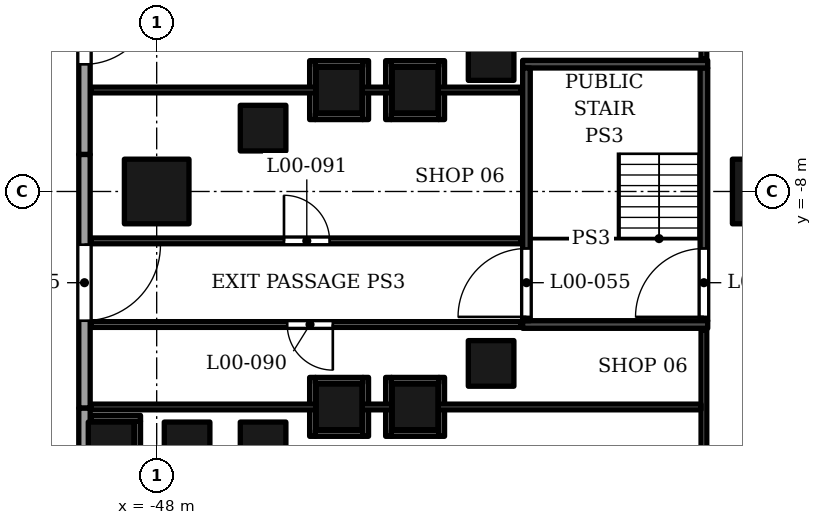
"""IFC4 building model, lengths in metres.
Left out: names, types, materials, properties, quantities, classifications, styles, units other than length and angle.
Written with IfcOpenShell. Run it as: python <this file> out.ifc"""

import sys

from ifc_helpers import new_model, si_unit, direction, frame, frame_2d, origin, origin_2d, place, context, subcontext, project, spatial, rectangle, extrude, element, fill, save


model = new_model("IFC4")
c1 = context("Model", 3, precision=1e-05, world=origin(), true_north=direction((0.0, 1.0)))
c2 = subcontext(c1, "Body", "Model", "MODEL_VIEW")
j1 = project(units=[si_unit("LENGTHUNIT", "METRE"), si_unit("PLANEANGLEUNIT", "RADIAN")], contexts=[c1])
p1 = place(None, origin())
s1 = spatial("IfcSite", under=j1, at=p1, CompositionType="ELEMENT")
p2 = place(p1, origin())
s2 = spatial("IfcBuilding", under=s1, at=p2, CompositionType="ELEMENT")
p3 = place(p2, origin())
s3 = spatial("IfcBuildingStorey", under=s2, at=p3, CompositionType="ELEMENT", Elevation=0.0)
for number, where, z_axis, x_axis in (
    (1, (-48.0, -8.0, 0.0), (0.0, 0.0, 1.0), (1.0, 0.0, 0.0)),
    (2, (-32.0, -8.0, 0.0), (0.0, 0.0, 1.0), (1.0, 0.0, 0.0)),
):
    element("IfcColumn", number, at=place(p3, frame(where, z_axis=z_axis, x_axis=x_axis)), inside=s3, PredefinedType="COLUMN", context=c2, shape_type="SweptSolid", body=[
        extrude(rectangle(XDim=1.7, YDim=1.7, at=origin_2d()), origin(), (0.0, 0.0, 1.0), 9.0),
    ])
for number, where, z_axis, x_axis in (
    (3, (-39.2, -12.524, 0.0), (0.0, 0.0, 1.0), (1.0, 0.0, 0.0)),
    (4, (-39.2, -4.476, 0.0), (0.0, 0.0, 1.0), (1.0, 0.0, 0.0)),
    (5, (-41.2, -13.667, 0.0), (0.0, 0.0, 1.0), (1.0, 0.0, 0.0)),
    (6, (-41.2, -5.333, 0.0), (0.0, 0.0, 1.0), (1.0, 0.0, 0.0)),
    (7, (-43.2, -13.667, 0.0), (0.0, 0.0, 1.0), (1.0, 0.0, 0.0)),
    (8, (-43.2, -5.333, 0.0), (0.0, 0.0, 1.0), (1.0, 0.0, 0.0)),
    (9, (-45.2, -14.667, 0.0), (0.0, 0.0, 1.0), (1.0, 0.0, 0.0)),
    (10, (-45.2, -6.333, 0.0), (0.0, 0.0, 1.0), (1.0, 0.0, 0.0)),
    (11, (-47.2, -14.667, 0.0), (0.0, 0.0, 1.0), (1.0, 0.0, 0.0)),
    (12, (-49.2, -14.667, 0.0), (0.0, 0.0, 1.0), (1.0, 0.0, 0.0)),
):
    element("IfcColumn", number, at=place(p3, frame(where, z_axis=z_axis, x_axis=x_axis)), inside=s3, PredefinedType="COLUMN", context=c2, shape_type="SweptSolid", body=[
        extrude(rectangle(XDim=1.2, YDim=1.2, at=origin_2d()), origin(), (0.0, 0.0, 1.0), 9.0),
    ])
p4 = place(p3, frame((-49.9, -2.527, 0.0), z_axis=(0.0, 0.0, 1.0), x_axis=(0.0, -1.0, 0.0)))
e13 = element("IfcWall", 13, at=p4, inside=s3, PredefinedType="ELEMENTEDWALL", context=c2, shape_type="SweptSolid", body=[
    extrude(rectangle(XDim=4.5, YDim=0.3, at=frame_2d((2.25, 0.0))), origin(), (0.0, 0.0, 1.0), 7.6),
])
p5 = place(p4, frame((0.327, 0.0, 0.0)))
e14 = element("IfcOpeningElement", 14, at=p5, cuts=e13, PredefinedType="OPENING", context=c2, shape_type="SweptSolid", body=[
    extrude(rectangle(XDim=1.8, YDim=2.7, at=frame_2d((0.9, 1.35))), frame((0.0, 0.16, 0.0), z_axis=(0.0, -1.0, 0.0), x_axis=(1.0, 0.0, 0.0)), (0.0, 0.0, 1.0), 0.32),
])
p6 = place(p3, frame((-49.9, -7.027, 0.0), z_axis=(0.0, 0.0, 1.0), x_axis=(0.0, -1.0, 0.0)))
e15 = element("IfcWall", 15, at=p6, inside=s3, PredefinedType="ELEMENTEDWALL", context=c2, shape_type="SweptSolid", body=[
    extrude(rectangle(XDim=6.675, YDim=0.3, at=frame_2d((3.337, 0.0))), origin(), (0.0, 0.0, 1.0), 7.6),
])
p7 = place(p6, frame((2.373, 0.0, 0.0)))
e16 = element("IfcOpeningElement", 16, at=p7, cuts=e15, PredefinedType="OPENING", context=c2, shape_type="SweptSolid", body=[
    extrude(rectangle(XDim=2.0, YDim=2.4, at=frame_2d((1.0, 1.2))), frame((0.0, 0.16, 0.0), z_axis=(0.0, -1.0, 0.0), x_axis=(1.0, 0.0, 0.0)), (0.0, 0.0, 1.0), 0.32),
])
p8 = place(p3, frame((-49.9, -13.702, 0.0), z_axis=(0.0, 0.0, 1.0), x_axis=(0.0, -1.0, 0.0)))
e17 = element("IfcWall", 17, at=p8, inside=s3, PredefinedType="ELEMENTEDWALL", context=c2, shape_type="SweptSolid", body=[
    extrude(rectangle(XDim=8.55, YDim=0.3, at=frame_2d((4.275, 0.0))), origin(), (0.0, 0.0, 1.0), 7.6),
])
p9 = place(p8, frame((2.302, 0.0, 0.0)))
e18 = element("IfcOpeningElement", 18, at=p9, cuts=e17, PredefinedType="OPENING", context=c2, shape_type="SweptSolid", body=[
    extrude(rectangle(XDim=3.0, YDim=2.7, at=frame_2d((1.5, 1.35))), frame((0.0, 0.16, 0.0), z_axis=(0.0, -1.0, 0.0), x_axis=(1.0, 0.0, 0.0)), (0.0, 0.0, 1.0), 0.32),
])
for number, where, z_axis, x_axis in (
    (19, (-49.85, 4.093, 9.0), (0.0, 0.0, 1.0), (0.0, -1.0, 0.0)),
    (20, (-49.85, -10.605, 9.0), (0.0, 0.0, 1.0), (0.0, -1.0, 0.0)),
):
    element("IfcWall", number, at=place(p3, frame(where, z_axis=z_axis, x_axis=x_axis)), inside=s3, PredefinedType="PARAPET", context=c2, shape_type="SweptSolid", body=[
        extrude(rectangle(XDim=14.698, YDim=0.3, at=frame_2d((7.349, 0.0))), origin(), (0.0, 0.0, 1.0), 1.1),
    ])
for number, where, z_axis, x_axis in (
    (21, (-38.37, -11.5, 0.0), (0.0, 0.0, 1.0), (1.0, 0.0, 0.0)),
    (22, (-38.37, -4.65, 0.0), (0.0, 0.0, 1.0), (1.0, 0.0, 0.0)),
):
    element("IfcWall", number, at=place(p3, frame(where, z_axis=z_axis, x_axis=x_axis)), inside=s3, PredefinedType="SOLIDWALL", context=c2, shape_type="SweptSolid", body=[
        extrude(rectangle(XDim=4.87, YDim=0.2, at=frame_2d((2.435, 0.0))), origin(), (0.0, 0.0, 1.0), 8.5),
    ])
p10 = place(p3, frame((-38.27, -11.4, 0.0), z_axis=(0.0, 0.0, 1.0), x_axis=(0.0, 1.0, 0.0)))
e23 = element("IfcWall", 23, at=p10, inside=s3, PredefinedType="SOLIDWALL", context=c2, shape_type="SweptSolid", body=[
    extrude(rectangle(XDim=6.65, YDim=0.2, at=frame_2d((3.325, 0.0))), origin(), (0.0, 0.0, 1.0), 8.5),
])
p11 = place(p10, frame((0.1, 0.0, 0.0)))
e24 = element("IfcOpeningElement", 24, at=p11, cuts=e23, PredefinedType="OPENING", context=c2, shape_type="SweptSolid", body=[
    extrude(rectangle(XDim=1.8, YDim=2.4, at=frame_2d((0.9, 1.2))), frame((0.0, 0.11, 0.0), z_axis=(0.0, -1.0, 0.0), x_axis=(1.0, 0.0, 0.0)), (0.0, 0.0, 1.0), 0.22),
])
p12 = place(p3, frame((-33.6, -11.4, 0.0), z_axis=(0.0, 0.0, 1.0), x_axis=(0.0, 1.0, 0.0)))
e25 = element("IfcWall", 25, at=p12, inside=s3, PredefinedType="SOLIDWALL", context=c2, shape_type="SweptSolid", body=[
    extrude(rectangle(XDim=6.65, YDim=0.2, at=frame_2d((3.325, 0.0))), origin(), (0.0, 0.0, 1.0), 8.5),
])
p13 = place(p12, frame((0.1, 0.0, 0.0)))
e26 = element("IfcOpeningElement", 26, at=p13, cuts=e25, PredefinedType="OPENING", context=c2, shape_type="SweptSolid", body=[
    extrude(rectangle(XDim=1.8, YDim=2.4, at=frame_2d((0.9, 1.2))), frame((0.0, 0.11, 0.0), z_axis=(0.0, -1.0, 0.0), x_axis=(1.0, 0.0, 0.0)), (0.0, 0.0, 1.0), 0.22),
])
p14 = place(p3, frame((-33.6, -20.61, 0.0), z_axis=(0.0, 0.0, 1.0), x_axis=(0.0, 1.0, 0.0)))
e27 = element("IfcWall", 27, at=p14, inside=s3, PredefinedType="PARTITIONING", context=c2, shape_type="SweptSolid", body=[
    extrude(rectangle(XDim=8.97, YDim=0.15, at=frame_2d((4.485, 0.0))), origin(), (0.0, 0.0, 1.0), 8.5),
])
p15 = place(p14, frame((2.711, 0.0, 0.0)))
e28 = element("IfcOpeningElement", 28, at=p15, cuts=e27, PredefinedType="OPENING", context=c2, shape_type="SweptSolid", body=[
    extrude(rectangle(XDim=1.2, YDim=2.1, at=frame_2d((0.6, 1.05))), frame((0.0, 0.085, 0.0), z_axis=(0.0, -1.0, 0.0), x_axis=(1.0, 0.0, 0.0)), (0.0, 0.0, 1.0), 0.17),
])
p16 = place(p3, frame((-48.5, -15.292, 0.0), z_axis=(0.0, 0.0, 1.0), x_axis=(0.0, 1.0, 0.0)))
e29 = element("IfcWall", 29, at=p16, inside=s3, PredefinedType="PARTITIONING", context=c2, shape_type="SweptSolid", body=[
    extrude(rectangle(XDim=1.25, YDim=0.15, at=frame_2d((0.625, 0.0))), origin(), (0.0, 0.0, 1.0), 8.5),
])
p17 = place(p3, frame((-43.9, -14.442, 0.0), z_axis=(0.0, 0.0, 1.0), x_axis=(0.0, 1.0, 0.0)))
e30 = element("IfcWall", 30, at=p17, inside=s3, PredefinedType="PARTITIONING", context=c2, shape_type="SweptSolid", body=[
    extrude(rectangle(XDim=1.55, YDim=0.15, at=frame_2d((0.775, 0.0))), origin(), (0.0, 0.0, 1.0), 8.5),
])
p18 = place(p3, frame((-43.825, -14.367, 0.0), z_axis=(0.0, 0.0, 1.0), x_axis=(1.0, 0.0, 0.0)))
e31 = element("IfcWall", 31, at=p18, inside=s3, PredefinedType="PARTITIONING", context=c2, shape_type="SweptSolid", body=[
    extrude(rectangle(XDim=1.25, YDim=0.15, at=frame_2d((0.625, 0.0))), origin(), (0.0, 0.0, 1.0), 8.5),
])
for number, where, z_axis, x_axis in (
    (32, (-42.5, -14.442, 0.0), (0.0, 0.0, 1.0), (0.0, 1.0, 0.0)),
    (33, (-41.9, -14.442, 0.0), (0.0, 0.0, 1.0), (0.0, 1.0, 0.0)),
):
    element("IfcWall", number, at=place(p3, frame(where, z_axis=z_axis, x_axis=x_axis)), inside=s3, PredefinedType="PARTITIONING", context=c2, shape_type="SweptSolid", body=[
        extrude(rectangle(XDim=1.55, YDim=0.15, at=frame_2d((0.775, 0.0))), origin(), (0.0, 0.0, 1.0), 8.5),
    ])
p19 = place(p3, frame((-41.825, -14.367, 0.0), z_axis=(0.0, 0.0, 1.0), x_axis=(1.0, 0.0, 0.0)))
e34 = element("IfcWall", 34, at=p19, inside=s3, PredefinedType="PARTITIONING", context=c2, shape_type="SweptSolid", body=[
    extrude(rectangle(XDim=1.25, YDim=0.15, at=frame_2d((0.625, 0.0))), origin(), (0.0, 0.0, 1.0), 8.5),
])
p20 = place(p3, frame((-40.5, -14.442, 0.0), z_axis=(0.0, 0.0, 1.0), x_axis=(0.0, 1.0, 0.0)))
e35 = element("IfcWall", 35, at=p20, inside=s3, PredefinedType="PARTITIONING", context=c2, shape_type="SweptSolid", body=[
    extrude(rectangle(XDim=1.55, YDim=0.15, at=frame_2d((0.775, 0.0))), origin(), (0.0, 0.0, 1.0), 8.5),
])
p21 = place(p3, frame((-49.72, -13.967, 0.0), z_axis=(0.0, 0.0, 1.0), x_axis=(1.0, 0.0, 0.0)))
e36 = element("IfcWall", 36, at=p21, inside=s3, PredefinedType="PARTITIONING", context=c2, shape_type="SweptSolid", body=[
    extrude(rectangle(XDim=1.295, YDim=0.15, at=frame_2d((0.647, 0.0))), origin(), (0.0, 0.0, 1.0), 8.5),
])
p22 = place(p3, frame((-49.72, -13.67, 0.0), z_axis=(0.0, 0.0, 1.0), x_axis=(1.0, 0.0, 0.0)))
e37 = element("IfcWall", 37, at=p22, inside=s3, PredefinedType="PARTITIONING", context=c2, shape_type="SweptSolid", body=[
    extrude(rectangle(XDim=5.92, YDim=0.15, at=frame_2d((2.96, 0.0))), origin(), (0.0, 0.0, 1.0), 7.6),
])
p23 = place(p3, frame((-42.6, -13.67, 0.0), z_axis=(0.0, 0.0, 1.0), x_axis=(1.0, 0.0, 0.0)))
e38 = element("IfcWall", 38, at=p23, inside=s3, PredefinedType="PARTITIONING", context=c2, shape_type="SweptSolid", body=[
    extrude(rectangle(XDim=0.8, YDim=0.15, at=frame_2d((0.4, 0.0))), origin(), (0.0, 0.0, 1.0), 8.5),
])
p24 = place(p3, frame((-40.6, -13.67, 0.0), z_axis=(0.0, 0.0, 1.0), x_axis=(1.0, 0.0, 0.0)))
e39 = element("IfcWall", 39, at=p24, inside=s3, PredefinedType="PARTITIONING", context=c2, shape_type="SweptSolid", body=[
    extrude(rectangle(XDim=6.925, YDim=0.15, at=frame_2d((3.462, 0.0))), origin(), (0.0, 0.0, 1.0), 8.5),
])
for number, where, z_axis, x_axis in (
    (40, (-43.825, -12.967, 0.0), (0.0, 0.0, 1.0), (1.0, 0.0, 0.0)),
    (41, (-41.825, -12.967, 0.0), (0.0, 0.0, 1.0), (1.0, 0.0, 0.0)),
):
    element("IfcWall", number, at=place(p3, frame(where, z_axis=z_axis, x_axis=x_axis)), inside=s3, PredefinedType="PARTITIONING", context=c2, shape_type="SweptSolid", body=[
        extrude(rectangle(XDim=1.25, YDim=0.15, at=frame_2d((0.625, 0.0))), origin(), (0.0, 0.0, 1.0), 8.5),
    ])
p25 = place(p3, frame((-49.72, -11.5, 0.0), z_axis=(0.0, 0.0, 1.0), x_axis=(1.0, 0.0, 0.0)))
e42 = element("IfcWall", 42, at=p25, inside=s3, PredefinedType="PARTITIONING", context=c2, shape_type="SweptSolid", body=[
    extrude(rectangle(XDim=11.31, YDim=0.151, at=frame_2d((5.655, 0.0))), origin(), (0.0, 0.0, 1.0), 7.6),
])
p26 = place(p25, frame((5.155, 0.0, 0.0)))
e43 = element("IfcOpeningElement", 43, at=p26, cuts=e42, PredefinedType="OPENING", context=c2, shape_type="SweptSolid", body=[
    extrude(rectangle(XDim=1.2, YDim=2.1, at=frame_2d((0.6, 1.05))), frame((0.0, 0.085, 0.0), z_axis=(0.0, -1.0, 0.0), x_axis=(1.0, 0.0, 0.0)), (0.0, 0.0, 1.0), 0.171),
])
p27 = place(p3, frame((-49.72, -9.3, 0.0), z_axis=(0.0, 0.0, 1.0), x_axis=(1.0, 0.0, 0.0)))
e44 = element("IfcWall", 44, at=p27, inside=s3, PredefinedType="PARTITIONING", context=c2, shape_type="SweptSolid", body=[
    extrude(rectangle(XDim=11.31, YDim=0.151, at=frame_2d((5.655, 0.0))), origin(), (0.0, 0.0, 1.0), 7.6),
])
p28 = place(p27, frame((5.07, 0.0, 0.0)))
e45 = element("IfcOpeningElement", 45, at=p28, cuts=e44, PredefinedType="OPENING", context=c2, shape_type="SweptSolid", body=[
    extrude(rectangle(XDim=1.2, YDim=2.1, at=frame_2d((0.6, 1.05))), frame((0.0, 0.085, 0.0), z_axis=(0.0, -1.0, 0.0), x_axis=(1.0, 0.0, 0.0)), (0.0, 0.0, 1.0), 0.171),
])
p29 = place(p3, frame((-43.9, -6.108, 0.0), z_axis=(0.0, 0.0, 1.0), x_axis=(0.0, 1.0, 0.0)))
e46 = element("IfcWall", 46, at=p29, inside=s3, PredefinedType="PARTITIONING", context=c2, shape_type="SweptSolid", body=[
    extrude(rectangle(XDim=1.55, YDim=0.15, at=frame_2d((0.775, 0.0))), origin(), (0.0, 0.0, 1.0), 8.5),
])
p30 = place(p3, frame((-43.825, -6.033, 0.0), z_axis=(0.0, 0.0, 1.0), x_axis=(1.0, 0.0, 0.0)))
e47 = element("IfcWall", 47, at=p30, inside=s3, PredefinedType="PARTITIONING", context=c2, shape_type="SweptSolid", body=[
    extrude(rectangle(XDim=1.25, YDim=0.15, at=frame_2d((0.625, 0.0))), origin(), (0.0, 0.0, 1.0), 8.5),
])
for number, where, z_axis, x_axis in (
    (48, (-42.5, -6.108, 0.0), (0.0, 0.0, 1.0), (0.0, 1.0, 0.0)),
    (49, (-41.9, -6.108, 0.0), (0.0, 0.0, 1.0), (0.0, 1.0, 0.0)),
):
    element("IfcWall", number, at=place(p3, frame(where, z_axis=z_axis, x_axis=x_axis)), inside=s3, PredefinedType="PARTITIONING", context=c2, shape_type="SweptSolid", body=[
        extrude(rectangle(XDim=1.55, YDim=0.15, at=frame_2d((0.775, 0.0))), origin(), (0.0, 0.0, 1.0), 8.5),
    ])
p31 = place(p3, frame((-41.825, -6.033, 0.0), z_axis=(0.0, 0.0, 1.0), x_axis=(1.0, 0.0, 0.0)))
e50 = element("IfcWall", 50, at=p31, inside=s3, PredefinedType="PARTITIONING", context=c2, shape_type="SweptSolid", body=[
    extrude(rectangle(XDim=1.25, YDim=0.15, at=frame_2d((0.625, 0.0))), origin(), (0.0, 0.0, 1.0), 8.5),
])
p32 = place(p3, frame((-40.5, -6.108, 0.0), z_axis=(0.0, 0.0, 1.0), x_axis=(0.0, 1.0, 0.0)))
e51 = element("IfcWall", 51, at=p32, inside=s3, PredefinedType="PARTITIONING", context=c2, shape_type="SweptSolid", body=[
    extrude(rectangle(XDim=1.55, YDim=0.15, at=frame_2d((0.775, 0.0))), origin(), (0.0, 0.0, 1.0), 8.5),
])
p33 = place(p3, frame((-49.72, -5.33, 0.0), z_axis=(0.0, 0.0, 1.0), x_axis=(1.0, 0.0, 0.0)))
e52 = element("IfcWall", 52, at=p33, inside=s3, PredefinedType="PARTITIONING", context=c2, shape_type="SweptSolid", body=[
    extrude(rectangle(XDim=5.92, YDim=0.15, at=frame_2d((2.96, 0.0))), origin(), (0.0, 0.0, 1.0), 7.6),
])
p34 = place(p3, frame((-42.6, -5.33, 0.0), z_axis=(0.0, 0.0, 1.0), x_axis=(1.0, 0.0, 0.0)))
e53 = element("IfcWall", 53, at=p34, inside=s3, PredefinedType="PARTITIONING", context=c2, shape_type="SweptSolid", body=[
    extrude(rectangle(XDim=0.8, YDim=0.15, at=frame_2d((0.4, 0.0))), origin(), (0.0, 0.0, 1.0), 8.5),
])
p35 = place(p3, frame((-40.6, -5.33, 0.0), z_axis=(0.0, 0.0, 1.0), x_axis=(1.0, 0.0, 0.0)))
e54 = element("IfcWall", 54, at=p35, inside=s3, PredefinedType="PARTITIONING", context=c2, shape_type="SweptSolid", body=[
    extrude(rectangle(XDim=2.19, YDim=0.15, at=frame_2d((1.095, 0.0))), origin(), (0.0, 0.0, 1.0), 8.5),
])
for number, where, z_axis, x_axis in (
    (55, (-43.825, -4.633, 0.0), (0.0, 0.0, 1.0), (1.0, 0.0, 0.0)),
    (56, (-41.825, -4.633, 0.0), (0.0, 0.0, 1.0), (1.0, 0.0, 0.0)),
):
    element("IfcWall", number, at=place(p3, frame(where, z_axis=z_axis, x_axis=x_axis)), inside=s3, PredefinedType="PARTITIONING", context=c2, shape_type="SweptSolid", body=[
        extrude(rectangle(XDim=1.25, YDim=0.15, at=frame_2d((0.625, 0.0))), origin(), (0.0, 0.0, 1.0), 8.5),
    ])
p36 = place(p3, frame((-33.6, -4.51, 0.0), z_axis=(0.0, 0.0, 1.0), x_axis=(0.0, 1.0, 0.0)))
e57 = element("IfcWall", 57, at=p36, inside=s3, PredefinedType="PARTITIONING", context=c2, shape_type="SweptSolid", body=[
    extrude(rectangle(XDim=2.07, YDim=0.15, at=frame_2d((1.035, 0.0))), origin(), (0.0, 0.0, 1.0), 8.5),
])
p37 = place(p5, origin())
e58 = element("IfcDoor", 58, at=p37, inside=s3, OperationType="DOUBLE_DOOR_SINGLE_SWING", PredefinedType="DOOR", context=c2, shape_type="SweptSolid", body=[
    extrude(rectangle(XDim=1.8, YDim=2.7, at=frame_2d((0.9, 1.35))), frame((0.0, 0.025, 0.0), z_axis=(0.0, -1.0, 0.0), x_axis=(1.0, 0.0, 0.0)), (0.0, 0.0, 1.0), 0.05),
])
fill(e14, e58)
p38 = place(p7, origin())
e59 = element("IfcDoor", 59, at=p38, inside=s3, OperationType="DOUBLE_DOOR_SINGLE_SWING", PredefinedType="DOOR", context=c2, shape_type="SweptSolid", body=[
    extrude(rectangle(XDim=2.0, YDim=2.4, at=frame_2d((1.0, 1.2))), frame((0.0, 0.025, 0.0), z_axis=(0.0, -1.0, 0.0), x_axis=(1.0, 0.0, 0.0)), (0.0, 0.0, 1.0), 0.05),
])
fill(e16, e59)
p39 = place(p13, origin())
e60 = element("IfcDoor", 60, at=p39, inside=s3, OperationType="DOUBLE_DOOR_SINGLE_SWING", PredefinedType="DOOR", context=c2, shape_type="SweptSolid", body=[
    extrude(rectangle(XDim=1.8, YDim=2.4, at=frame_2d((0.9, 1.2))), frame((0.0, 0.025, 0.0), z_axis=(0.0, -1.0, 0.0), x_axis=(1.0, 0.0, 0.0)), (0.0, 0.0, 1.0), 0.05),
])
fill(e26, e60)
p40 = place(p11, origin())
e61 = element("IfcDoor", 61, at=p40, inside=s3, OperationType="DOUBLE_DOOR_SINGLE_SWING", PredefinedType="DOOR", context=c2, shape_type="SweptSolid", body=[
    extrude(rectangle(XDim=1.8, YDim=2.4, at=frame_2d((0.9, 1.2))), frame((0.0, 0.025, 0.0), z_axis=(0.0, -1.0, 0.0), x_axis=(1.0, 0.0, 0.0)), (0.0, 0.0, 1.0), 0.05),
])
fill(e24, e61)
p41 = place(p26, origin())
e62 = element("IfcDoor", 62, at=p41, inside=s3, OperationType="SINGLE_SWING_RIGHT", PredefinedType="DOOR", context=c2, shape_type="SweptSolid", body=[
    extrude(rectangle(XDim=1.2, YDim=2.1, at=frame_2d((0.6, 1.05))), frame((0.0, 0.025, 0.0), z_axis=(0.0, -1.0, 0.0), x_axis=(1.0, 0.0, 0.0)), (0.0, 0.0, 1.0), 0.05),
])
fill(e43, e62)
p42 = place(p28, origin())
e63 = element("IfcDoor", 63, at=p42, inside=s3, OperationType="SINGLE_SWING_LEFT", PredefinedType="DOOR", context=c2, shape_type="SweptSolid", body=[
    extrude(rectangle(XDim=1.2, YDim=2.1, at=frame_2d((0.6, 1.05))), frame((0.0, 0.025, 0.0), z_axis=(0.0, -1.0, 0.0), x_axis=(1.0, 0.0, 0.0)), (0.0, 0.0, 1.0), 0.05),
])
fill(e45, e63)
save(model, sys.argv[1])
